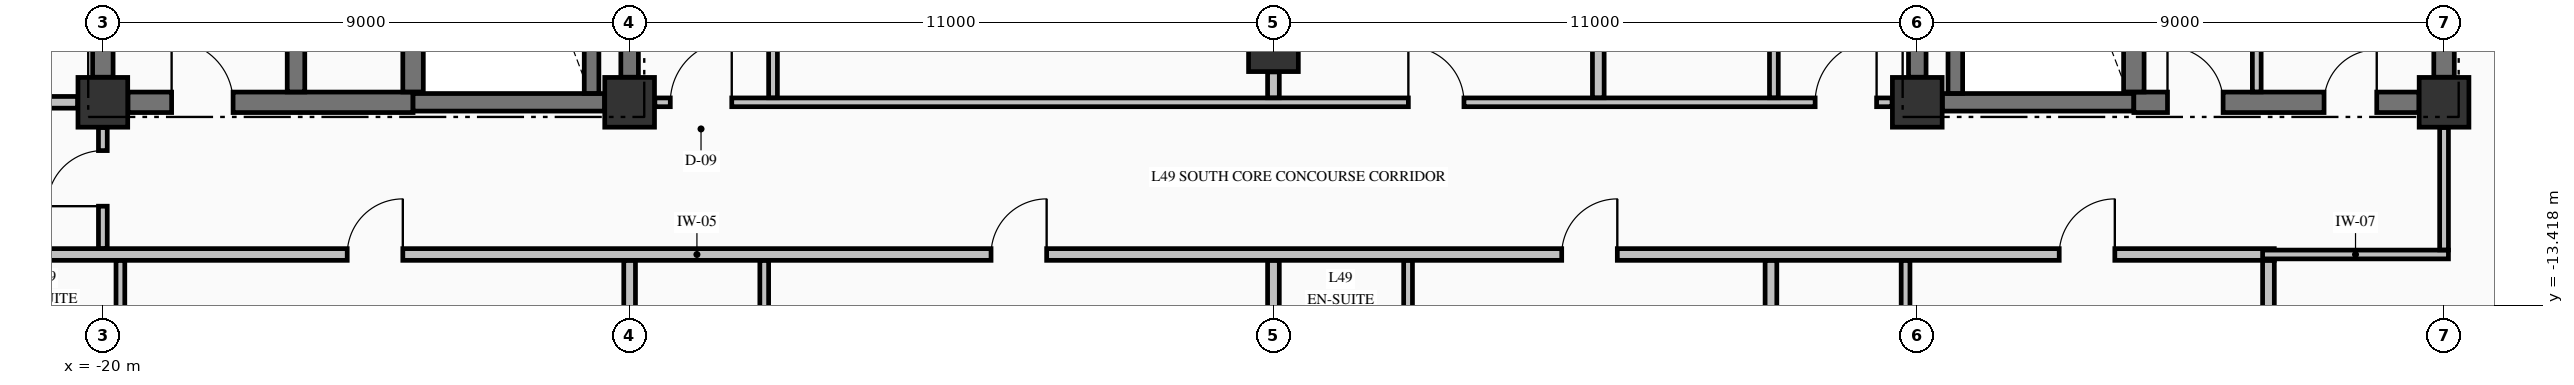
"""IFC4 building model, lengths in metres.
Left out: names, types, materials, properties, quantities, classifications, styles, units other than length and angle.
Written with IfcOpenShell. Run it as: python <this file> out.ifc"""

import sys

from ifc_helpers import new_model, si_unit, direction, frame, frame_2d, origin, origin_2d, place, context, subcontext, project, spatial, rectangle, extrude, element, fill, save


model = new_model("IFC4")
c1 = context("Model", 3, precision=1e-05, world=origin(), true_north=direction((0.0, 1.0)))
c2 = subcontext(c1, "Body", "Model", "MODEL_VIEW")
j1 = project(units=[si_unit("LENGTHUNIT", "METRE"), si_unit("PLANEANGLEUNIT", "RADIAN")], contexts=[c1])
p1 = place(None, origin())
s1 = spatial("IfcSite", under=j1, at=p1, CompositionType="ELEMENT")
p2 = place(p1, origin())
s2 = spatial("IfcBuilding", under=s1, at=p2, CompositionType="ELEMENT")
p3 = place(p2, frame((0.0, 0.0, 191.46)))
s3 = spatial("IfcBuildingStorey", under=s2, at=p3, CompositionType="ELEMENT", Elevation=191.46)
for number, where, z_axis, x_axis in (
    (1, (-20.0, -9.95, -0.425), (0.0, 0.0, 1.0), (1.0, 0.0, 0.0)),
    (2, (-11.0, -9.95, -0.425), (0.0, 0.0, 1.0), (1.0, 0.0, 0.0)),
    (3, (11.0, -9.95, -0.425), (0.0, 0.0, 1.0), (1.0, 0.0, 0.0)),
    (4, (20.0, -9.95, -0.425), (0.0, 0.0, 1.0), (1.0, 0.0, 0.0)),
    (5, (0.0, -9.0, -0.425), (0.0, 0.0, 1.0), (1.0, 0.0, 0.0)),
):
    element("IfcColumn", number, at=place(p3, frame(where, z_axis=z_axis, x_axis=x_axis)), inside=s3, PredefinedType="COLUMN", context=c2, shape_type="SweptSolid", body=[
        extrude(rectangle(XDim=0.85, YDim=0.85, at=origin_2d()), origin(), (0.0, 0.0, 1.0), 3.55),
    ])
p4 = place(p3, frame((-19.571, -9.95, 0.0), z_axis=(0.0, 0.0, 1.0), x_axis=(1.0, 0.0, 0.0)))
e6 = element("IfcWall", 6, at=p4, inside=s3, PredefinedType="SHEAR", context=c2, shape_type="SweptSolid", body=[
    extrude(rectangle(XDim=4.871, YDim=0.35, at=frame_2d((2.436, 0.0))), origin(), (0.0, 0.0, 1.0), 3.125),
])
p5 = place(p4, frame((0.746, 0.0, 0.0)))
e7 = element("IfcOpeningElement", 7, at=p5, cuts=e6, PredefinedType="OPENING", context=c2, shape_type="SweptSolid", body=[
    extrude(rectangle(XDim=1.05, YDim=2.15, at=frame_2d((0.525, 1.075))), frame((0.0, 0.185, 0.0), z_axis=(0.0, -1.0, 0.0), x_axis=(1.0, 0.0, 0.0)), (0.0, 0.0, 1.0), 0.37),
])
for number, where, z_axis, x_axis in (
    (8, (-14.7, -9.95, 0.0), (0.0, 0.0, 1.0), (1.0, 0.0, 0.0)),
    (9, (11.429, -9.95, 0.0), (0.0, 0.0, 1.0), (1.0, 0.0, 0.0)),
):
    element("IfcWall", number, at=place(p3, frame(where, z_axis=z_axis, x_axis=x_axis)), inside=s3, PredefinedType="SHEAR", context=c2, shape_type="SweptSolid", body=[
        extrude(rectangle(XDim=3.271, YDim=0.3, at=frame_2d((1.635, 0.0))), origin(), (0.0, 0.0, 1.0), 3.125),
    ])
p6 = place(p3, frame((14.7, -9.95, 0.0), z_axis=(0.0, 0.0, 1.0), x_axis=(1.0, 0.0, 0.0)))
e10 = element("IfcWall", 10, at=p6, inside=s3, PredefinedType="SHEAR", context=c2, shape_type="SweptSolid", body=[
    extrude(rectangle(XDim=4.871, YDim=0.35, at=frame_2d((2.436, 0.0))), origin(), (0.0, 0.0, 1.0), 3.125),
])
p7 = place(p6, frame((3.25, 0.0, 0.0)))
e11 = element("IfcOpeningElement", 11, at=p7, cuts=e10, PredefinedType="OPENING", context=c2, shape_type="SweptSolid", body=[
    extrude(rectangle(XDim=0.9, YDim=2.15, at=frame_2d((0.45, 1.075))), frame((0.0, 0.185, 0.0), z_axis=(0.0, -1.0, 0.0), x_axis=(1.0, 0.0, 0.0)), (0.0, 0.0, 1.0), 0.37),
])
p8 = place(p6, frame((0.575, 0.0, 0.0)))
e12 = element("IfcOpeningElement", 12, at=p8, cuts=e10, PredefinedType="OPENING", context=c2, shape_type="SweptSolid", body=[
    extrude(rectangle(XDim=0.95, YDim=2.15, at=frame_2d((0.475, 1.075))), frame((0.0, 0.185, 0.0), z_axis=(0.0, -1.0, 0.0), x_axis=(1.0, 0.0, 0.0)), (0.0, 0.0, 1.0), 0.37),
])
p9 = place(p3, frame((-22.1, -12.55, 0.0), z_axis=(0.0, 0.0, 1.0), x_axis=(1.0, 0.0, 0.0)))
e13 = element("IfcWall", 13, at=p9, inside=s3, PredefinedType="PARTITIONING", context=c2, shape_type="SweptSolid", body=[
    extrude(rectangle(XDim=39.2, YDim=0.2, at=frame_2d((19.6, 0.0))), origin(), (0.0, 0.0, 1.0), 3.125),
])
p10 = place(p9, frame((6.275, 0.0, 0.0)))
e14 = element("IfcOpeningElement", 14, at=p10, cuts=e13, PredefinedType="OPENING", context=c2, shape_type="SweptSolid", body=[
    extrude(rectangle(XDim=0.95, YDim=2.15, at=frame_2d((0.475, 1.075))), frame((0.0, 0.11, 0.0), z_axis=(0.0, -1.0, 0.0), x_axis=(1.0, 0.0, 0.0)), (0.0, 0.0, 1.0), 0.22),
])
p11 = place(p9, frame((17.275, 0.0, 0.0)))
e15 = element("IfcOpeningElement", 15, at=p11, cuts=e13, PredefinedType="OPENING", context=c2, shape_type="SweptSolid", body=[
    extrude(rectangle(XDim=0.95, YDim=2.15, at=frame_2d((0.475, 1.075))), frame((0.0, 0.11, 0.0), z_axis=(0.0, -1.0, 0.0), x_axis=(1.0, 0.0, 0.0)), (0.0, 0.0, 1.0), 0.22),
])
p12 = place(p9, frame((27.025, 0.0, 0.0)))
e16 = element("IfcOpeningElement", 16, at=p12, cuts=e13, PredefinedType="OPENING", context=c2, shape_type="SweptSolid", body=[
    extrude(rectangle(XDim=0.95, YDim=2.15, at=frame_2d((0.475, 1.075))), frame((0.0, 0.11, 0.0), z_axis=(0.0, -1.0, 0.0), x_axis=(1.0, 0.0, 0.0)), (0.0, 0.0, 1.0), 0.22),
])
p13 = place(p9, frame((35.525, 0.0, 0.0)))
e17 = element("IfcOpeningElement", 17, at=p13, cuts=e13, PredefinedType="OPENING", context=c2, shape_type="SweptSolid", body=[
    extrude(rectangle(XDim=0.95, YDim=2.15, at=frame_2d((0.475, 1.075))), frame((0.0, 0.11, 0.0), z_axis=(0.0, -1.0, 0.0), x_axis=(1.0, 0.0, 0.0)), (0.0, 0.0, 1.0), 0.22),
])
p14 = place(p3, frame((16.9, -12.55, 0.0), z_axis=(0.0, 0.0, 1.0), x_axis=(1.0, 0.0, 0.0)))
e18 = element("IfcWall", 18, at=p14, inside=s3, PredefinedType="PARTITIONING", context=c2, shape_type="SweptSolid", body=[
    extrude(rectangle(XDim=3.175, YDim=0.15, at=frame_2d((1.587, 0.0))), origin(), (0.0, 0.0, 1.0), 3.125),
])
p15 = place(p3, frame((-26.835, -9.95, 0.0), z_axis=(0.0, 0.0, 1.0), x_axis=(1.0, 0.0, 0.0)))
e19 = element("IfcWall", 19, at=p15, inside=s3, PredefinedType="PARTITIONING", context=c2, shape_type="SweptSolid", body=[
    extrude(rectangle(XDim=6.404, YDim=0.2, at=frame_2d((3.202, 0.0))), origin(), (0.0, 0.0, 1.0), 3.125),
])
p16 = place(p15, frame((2.86, 0.0, 0.0)))
e20 = element("IfcOpeningElement", 20, at=p16, cuts=e19, PredefinedType="OPENING", context=c2, shape_type="SweptSolid", body=[
    extrude(rectangle(XDim=0.95, YDim=2.15, at=frame_2d((0.475, 1.075))), frame((0.0, 0.11, 0.0), z_axis=(0.0, -1.0, 0.0), x_axis=(1.0, 0.0, 0.0)), (0.0, 0.0, 1.0), 0.22),
])
p17 = place(p3, frame((-10.569, -9.95, 0.0), z_axis=(0.0, 0.0, 1.0), x_axis=(1.0, 0.0, 0.0)))
e21 = element("IfcWall", 21, at=p17, inside=s3, PredefinedType="PARTITIONING", context=c2, shape_type="SweptSolid", body=[
    extrude(rectangle(XDim=21.138, YDim=0.15, at=frame_2d((10.569, 0.0))), origin(), (0.0, 0.0, 1.0), 3.125),
])
p18 = place(p17, frame((0.264, 0.0, 0.0)))
e22 = element("IfcOpeningElement", 22, at=p18, cuts=e21, PredefinedType="OPENING", context=c2, shape_type="SweptSolid", body=[
    extrude(rectangle(XDim=1.05, YDim=2.15, at=frame_2d((0.525, 1.075))), frame((0.0, 0.085, 0.0), z_axis=(0.0, -1.0, 0.0), x_axis=(1.0, 0.0, 0.0)), (0.0, 0.0, 1.0), 0.17),
])
p19 = place(p17, frame((19.824, 0.0, 0.0)))
e23 = element("IfcOpeningElement", 23, at=p19, cuts=e21, PredefinedType="OPENING", context=c2, shape_type="SweptSolid", body=[
    extrude(rectangle(XDim=1.05, YDim=2.15, at=frame_2d((0.525, 1.075))), frame((0.0, 0.085, 0.0), z_axis=(0.0, -1.0, 0.0), x_axis=(1.0, 0.0, 0.0)), (0.0, 0.0, 1.0), 0.17),
])
p20 = place(p17, frame((12.874, 0.0, 0.0)))
e24 = element("IfcOpeningElement", 24, at=p20, cuts=e21, PredefinedType="OPENING", context=c2, shape_type="SweptSolid", body=[
    extrude(rectangle(XDim=0.95, YDim=2.15, at=frame_2d((0.475, 1.075))), frame((0.0, 0.085, 0.0), z_axis=(0.0, -1.0, 0.0), x_axis=(1.0, 0.0, 0.0)), (0.0, 0.0, 1.0), 0.17),
])
p21 = place(p3, frame((-20.0, -9.521, 0.0), z_axis=(0.0, 0.0, 1.0), x_axis=(0.0, 1.0, 0.0)))
e25 = element("IfcWall", 25, at=p21, inside=s3, PredefinedType="SHEAR", context=c2, shape_type="SweptSolid", body=[
    extrude(rectangle(XDim=9.092, YDim=0.35, at=frame_2d((4.546, 0.0))), origin(), (0.0, 0.0, 1.0), 3.125),
])
p22 = place(p3, frame((-16.7, -9.773, 0.0), z_axis=(0.0, 0.0, 1.0), x_axis=(0.0, 1.0, 0.0)))
e26 = element("IfcWall", 26, at=p22, inside=s3, PredefinedType="SHEAR", context=c2, shape_type="SweptSolid", body=[
    extrude(rectangle(XDim=9.371, YDim=0.3, at=frame_2d((4.686, 0.0))), origin(), (0.0, 0.0, 1.0), 3.125),
])
p23 = place(p3, frame((-14.7, -9.773, 0.0), z_axis=(0.0, 0.0, 1.0), x_axis=(0.0, 1.0, 0.0)))
e27 = element("IfcWall", 27, at=p23, inside=s3, PredefinedType="SHEAR", context=c2, shape_type="SweptSolid", body=[
    extrude(rectangle(XDim=9.371, YDim=0.35, at=frame_2d((4.686, 0.0))), origin(), (0.0, 0.0, 1.0), 3.125),
])
p24 = place(p3, frame((-11.65, -9.798, 0.0), z_axis=(0.0, 0.0, 1.0), x_axis=(0.0, 1.0, 0.0)))
e28 = element("IfcWall", 28, at=p24, inside=s3, PredefinedType="SOLIDWALL", context=c2, shape_type="SweptSolid", body=[
    extrude(rectangle(XDim=9.396, YDim=0.25, at=frame_2d((4.698, 0.0))), origin(), (0.0, 0.0, 1.0), 3.125),
])
for number, where, z_axis, x_axis in (
    (29, (-11.0, -9.521, 0.0), (0.0, 0.0, 1.0), (0.0, 1.0, 0.0)),
    (30, (11.0, -9.521, 0.0), (0.0, 0.0, 1.0), (0.0, 1.0, 0.0)),
):
    element("IfcWall", number, at=place(p3, frame(where, z_axis=z_axis, x_axis=x_axis)), inside=s3, PredefinedType="SHEAR", context=c2, shape_type="SweptSolid", body=[
        extrude(rectangle(XDim=9.092, YDim=0.3, at=frame_2d((4.546, 0.0))), origin(), (0.0, 0.0, 1.0), 3.125),
    ])
p25 = place(p3, frame((11.65, -9.798, 0.0), z_axis=(0.0, 0.0, 1.0), x_axis=(0.0, 1.0, 0.0)))
e31 = element("IfcWall", 31, at=p25, inside=s3, PredefinedType="SOLIDWALL", context=c2, shape_type="SweptSolid", body=[
    extrude(rectangle(XDim=9.396, YDim=0.25, at=frame_2d((4.698, 0.0))), origin(), (0.0, 0.0, 1.0), 3.125),
])
p26 = place(p3, frame((14.7, -9.773, 0.0), z_axis=(0.0, 0.0, 1.0), x_axis=(0.0, 1.0, 0.0)))
e32 = element("IfcWall", 32, at=p26, inside=s3, PredefinedType="SHEAR", context=c2, shape_type="SweptSolid", body=[
    extrude(rectangle(XDim=9.371, YDim=0.35, at=frame_2d((4.686, 0.0))), origin(), (0.0, 0.0, 1.0), 3.125),
])
p27 = place(p3, frame((20.0, -9.521, 0.0), z_axis=(0.0, 0.0, 1.0), x_axis=(0.0, 1.0, 0.0)))
e33 = element("IfcWall", 33, at=p27, inside=s3, PredefinedType="SHEAR", context=c2, shape_type="SweptSolid", body=[
    extrude(rectangle(XDim=9.092, YDim=0.35, at=frame_2d((4.546, 0.0))), origin(), (0.0, 0.0, 1.0), 3.125),
])
p28 = place(p3, frame((-20.0, -12.447, 0.0), z_axis=(0.0, 0.0, 1.0), x_axis=(0.0, 1.0, 0.0)))
e34 = element("IfcWall", 34, at=p28, inside=s3, PredefinedType="PARTITIONING", context=c2, shape_type="SweptSolid", body=[
    extrude(rectangle(XDim=2.066, YDim=0.15, at=frame_2d((1.033, 0.0))), origin(), (0.0, 0.0, 1.0), 2.317),
])
p29 = place(p28, frame((0.722, 0.0, 0.0)))
e35 = element("IfcOpeningElement", 35, at=p29, cuts=e34, PredefinedType="OPENING", context=c2, shape_type="SweptSolid", body=[
    extrude(rectangle(XDim=0.95, YDim=2.15, at=frame_2d((0.475, 1.075))), frame((0.0, 0.085, 0.0), z_axis=(0.0, -1.0, 0.0), x_axis=(1.0, 0.0, 0.0)), (0.0, 0.0, 1.0), 0.17),
])
p30 = place(p3, frame((-19.7, -15.422, 0.0), z_axis=(0.0, 0.0, 1.0), x_axis=(0.0, 1.0, 0.0)))
e36 = element("IfcWall", 36, at=p30, inside=s3, PredefinedType="PARTITIONING", context=c2, shape_type="SweptSolid", body=[
    extrude(rectangle(XDim=2.769, YDim=0.15, at=frame_2d((1.385, 0.0))), origin(), (0.0, 0.0, 1.0), 2.317),
])
p31 = place(p3, frame((-11.0, -14.722, 0.0), z_axis=(0.0, 0.0, 1.0), x_axis=(0.0, 1.0, 0.0)))
e37 = element("IfcWall", 37, at=p31, inside=s3, PredefinedType="PARTITIONING", context=c2, shape_type="SweptSolid", body=[
    extrude(rectangle(XDim=2.069, YDim=0.2, at=frame_2d((1.034, 0.0))), origin(), (0.0, 0.0, 1.0), 2.317),
])
p32 = place(p3, frame((-8.7, -14.722, 0.0), z_axis=(0.0, 0.0, 1.0), x_axis=(0.0, 1.0, 0.0)))
e38 = element("IfcWall", 38, at=p32, inside=s3, PredefinedType="PARTITIONING", context=c2, shape_type="SweptSolid", body=[
    extrude(rectangle(XDim=2.069, YDim=0.15, at=frame_2d((1.034, 0.0))), origin(), (0.0, 0.0, 1.0), 3.125),
])
p33 = place(p3, frame((-8.55, -9.872, 0.0), z_axis=(0.0, 0.0, 1.0), x_axis=(0.0, 1.0, 0.0)))
e39 = element("IfcWall", 39, at=p33, inside=s3, PredefinedType="PARTITIONING", context=c2, shape_type="SweptSolid", body=[
    extrude(rectangle(XDim=12.969, YDim=0.15, at=frame_2d((6.484, 0.0))), origin(), (0.0, 0.0, 1.0), 3.125),
])
p34 = place(p33, frame((6.002, 0.0, 0.0)))
e40 = element("IfcOpeningElement", 40, at=p34, cuts=e39, PredefinedType="OPENING", context=c2, shape_type="SweptSolid", body=[
    extrude(rectangle(XDim=1.0, YDim=2.15, at=frame_2d((0.5, 1.075))), frame((0.0, 0.085, 0.0), z_axis=(0.0, -1.0, 0.0), x_axis=(1.0, 0.0, 0.0)), (0.0, 0.0, 1.0), 0.17),
])
p35 = place(p3, frame((0.0, -15.422, 0.0), z_axis=(0.0, 0.0, 1.0), x_axis=(0.0, 1.0, 0.0)))
e41 = element("IfcWall", 41, at=p35, inside=s3, PredefinedType="PARTITIONING", context=c2, shape_type="SweptSolid", body=[
    extrude(rectangle(XDim=2.769, YDim=0.2, at=frame_2d((1.385, 0.0))), origin(), (0.0, 0.0, 1.0), 2.317),
])
p36 = place(p3, frame((0.0, -9.872, 0.0), z_axis=(0.0, 0.0, 1.0), x_axis=(0.0, 1.0, 0.0)))
e42 = element("IfcWall", 42, at=p36, inside=s3, PredefinedType="PARTITIONING", context=c2, shape_type="SweptSolid", body=[
    extrude(rectangle(XDim=0.441, YDim=0.2, at=frame_2d((0.221, 0.0))), origin(), (0.0, 0.0, 1.0), 2.317),
])
p37 = place(p3, frame((2.3, -15.422, 0.0), z_axis=(0.0, 0.0, 1.0), x_axis=(0.0, 1.0, 0.0)))
e43 = element("IfcWall", 43, at=p37, inside=s3, PredefinedType="PARTITIONING", context=c2, shape_type="SweptSolid", body=[
    extrude(rectangle(XDim=2.769, YDim=0.15, at=frame_2d((1.385, 0.0))), origin(), (0.0, 0.0, 1.0), 3.125),
])
p38 = place(p3, frame((5.55, -9.872, 0.0), z_axis=(0.0, 0.0, 1.0), x_axis=(0.0, 1.0, 0.0)))
e44 = element("IfcWall", 44, at=p38, inside=s3, PredefinedType="PARTITIONING", context=c2, shape_type="SweptSolid", body=[
    extrude(rectangle(XDim=4.569, YDim=0.2, at=frame_2d((2.285, 0.0))), origin(), (0.0, 0.0, 1.0), 3.125),
])
p39 = place(p3, frame((8.5, -14.722, 0.0), z_axis=(0.0, 0.0, 1.0), x_axis=(0.0, 1.0, 0.0)))
e45 = element("IfcWall", 45, at=p39, inside=s3, PredefinedType="PARTITIONING", context=c2, shape_type="SweptSolid", body=[
    extrude(rectangle(XDim=2.069, YDim=0.2, at=frame_2d((1.034, 0.0))), origin(), (0.0, 0.0, 1.0), 3.125),
])
p40 = place(p3, frame((8.55, -9.872, 0.0), z_axis=(0.0, 0.0, 1.0), x_axis=(0.0, 1.0, 0.0)))
e46 = element("IfcWall", 46, at=p40, inside=s3, PredefinedType="PARTITIONING", context=c2, shape_type="SweptSolid", body=[
    extrude(rectangle(XDim=4.569, YDim=0.15, at=frame_2d((2.285, 0.0))), origin(), (0.0, 0.0, 1.0), 3.125),
])
p41 = place(p40, frame((1.847, 0.0, 0.0)))
e47 = element("IfcOpeningElement", 47, at=p41, cuts=e46, PredefinedType="OPENING", context=c2, shape_type="SweptSolid", body=[
    extrude(rectangle(XDim=0.95, YDim=2.15, at=frame_2d((0.475, 1.075))), frame((0.0, 0.085, 0.0), z_axis=(0.0, -1.0, 0.0), x_axis=(1.0, 0.0, 0.0)), (0.0, 0.0, 1.0), 0.17),
])
p42 = place(p3, frame((10.8, -14.722, 0.0), z_axis=(0.0, 0.0, 1.0), x_axis=(0.0, 1.0, 0.0)))
e48 = element("IfcWall", 48, at=p42, inside=s3, PredefinedType="PARTITIONING", context=c2, shape_type="SweptSolid", body=[
    extrude(rectangle(XDim=2.069, YDim=0.15, at=frame_2d((1.034, 0.0))), origin(), (0.0, 0.0, 1.0), 2.317),
])
p43 = place(p3, frame((16.8, -9.772, 0.0), z_axis=(0.0, 0.0, 1.0), x_axis=(0.0, 1.0, 0.0)))
e49 = element("IfcWall", 49, at=p43, inside=s3, PredefinedType="PARTITIONING", context=c2, shape_type="SweptSolid", body=[
    extrude(rectangle(XDim=7.194, YDim=0.15, at=frame_2d((3.597, 0.0))), origin(), (0.0, 0.0, 1.0), 3.125),
])
p44 = place(p3, frame((17.0, -18.994, 0.0), z_axis=(0.0, 0.0, 1.0), x_axis=(0.0, 1.0, 0.0)))
e50 = element("IfcWall", 50, at=p44, inside=s3, PredefinedType="PARTITIONING", context=c2, shape_type="SweptSolid", body=[
    extrude(rectangle(XDim=6.341, YDim=0.2, at=frame_2d((3.17, 0.0))), origin(), (0.0, 0.0, 1.0), 3.125),
])
p45 = place(p3, frame((20.0, -12.472, 0.0), z_axis=(0.0, 0.0, 1.0), x_axis=(0.0, 1.0, 0.0)))
e51 = element("IfcWall", 51, at=p45, inside=s3, PredefinedType="PARTITIONING", context=c2, shape_type="SweptSolid", body=[
    extrude(rectangle(XDim=2.091, YDim=0.15, at=frame_2d((1.045, 0.0))), origin(), (0.0, 0.0, 1.0), 2.317),
])
p46 = place(p5, origin())
e52 = element("IfcDoor", 52, at=p46, inside=s3, OperationType="SINGLE_SWING_LEFT", PredefinedType="DOOR", context=c2, shape_type="SweptSolid", body=[
    extrude(rectangle(XDim=1.05, YDim=2.15, at=frame_2d((0.525, 1.075))), frame((0.0, 0.025, 0.0), z_axis=(0.0, -1.0, 0.0), x_axis=(1.0, 0.0, 0.0)), (0.0, 0.0, 1.0), 0.05),
])
fill(e7, e52)
p47 = place(p7, origin())
e53 = element("IfcDoor", 53, at=p47, inside=s3, OperationType="SINGLE_SWING_RIGHT", PredefinedType="DOOR", context=c2, shape_type="SweptSolid", body=[
    extrude(rectangle(XDim=0.9, YDim=2.15, at=frame_2d((0.45, 1.075))), frame((0.0, 0.025, 0.0), z_axis=(0.0, -1.0, 0.0), x_axis=(1.0, 0.0, 0.0)), (0.0, 0.0, 1.0), 0.05),
])
fill(e11, e53)
p48 = place(p8, origin())
e54 = element("IfcDoor", 54, at=p48, inside=s3, OperationType="SINGLE_SWING_LEFT", PredefinedType="DOOR", context=c2, shape_type="SweptSolid", body=[
    extrude(rectangle(XDim=0.95, YDim=2.15, at=frame_2d((0.475, 1.075))), frame((0.0, 0.025, 0.0), z_axis=(0.0, -1.0, 0.0), x_axis=(1.0, 0.0, 0.0)), (0.0, 0.0, 1.0), 0.05),
])
fill(e12, e54)
p49 = place(p18, origin())
e55 = element("IfcDoor", 55, at=p49, inside=s3, OperationType="SINGLE_SWING_RIGHT", PredefinedType="DOOR", context=c2, shape_type="SweptSolid", body=[
    extrude(rectangle(XDim=1.05, YDim=2.15, at=frame_2d((0.525, 1.075))), frame((0.0, 0.025, 0.0), z_axis=(0.0, -1.0, 0.0), x_axis=(1.0, 0.0, 0.0)), (0.0, 0.0, 1.0), 0.05),
])
fill(e22, e55)
p50 = place(p19, origin())
e56 = element("IfcDoor", 56, at=p50, inside=s3, OperationType="SINGLE_SWING_RIGHT", PredefinedType="DOOR", context=c2, shape_type="SweptSolid", body=[
    extrude(rectangle(XDim=1.05, YDim=2.15, at=frame_2d((0.525, 1.075))), frame((0.0, 0.025, 0.0), z_axis=(0.0, -1.0, 0.0), x_axis=(1.0, 0.0, 0.0)), (0.0, 0.0, 1.0), 0.05),
])
fill(e23, e56)
p51 = place(p10, origin())
e57 = element("IfcDoor", 57, at=p51, inside=s3, OperationType="SINGLE_SWING_RIGHT", PredefinedType="DOOR", context=c2, shape_type="SweptSolid", body=[
    extrude(rectangle(XDim=0.95, YDim=2.15, at=frame_2d((0.475, 1.075))), frame((0.0, 0.025, 0.0), z_axis=(0.0, -1.0, 0.0), x_axis=(1.0, 0.0, 0.0)), (0.0, 0.0, 1.0), 0.05),
])
fill(e14, e57)
p52 = place(p11, origin())
e58 = element("IfcDoor", 58, at=p52, inside=s3, OperationType="SINGLE_SWING_RIGHT", PredefinedType="DOOR", context=c2, shape_type="SweptSolid", body=[
    extrude(rectangle(XDim=0.95, YDim=2.15, at=frame_2d((0.475, 1.075))), frame((0.0, 0.025, 0.0), z_axis=(0.0, -1.0, 0.0), x_axis=(1.0, 0.0, 0.0)), (0.0, 0.0, 1.0), 0.05),
])
fill(e15, e58)
p53 = place(p12, origin())
e59 = element("IfcDoor", 59, at=p53, inside=s3, OperationType="SINGLE_SWING_RIGHT", PredefinedType="DOOR", context=c2, shape_type="SweptSolid", body=[
    extrude(rectangle(XDim=0.95, YDim=2.15, at=frame_2d((0.475, 1.075))), frame((0.0, 0.025, 0.0), z_axis=(0.0, -1.0, 0.0), x_axis=(1.0, 0.0, 0.0)), (0.0, 0.0, 1.0), 0.05),
])
fill(e16, e59)
p54 = place(p13, origin())
e60 = element("IfcDoor", 60, at=p54, inside=s3, OperationType="SINGLE_SWING_RIGHT", PredefinedType="DOOR", context=c2, shape_type="SweptSolid", body=[
    extrude(rectangle(XDim=0.95, YDim=2.15, at=frame_2d((0.475, 1.075))), frame((0.0, 0.025, 0.0), z_axis=(0.0, -1.0, 0.0), x_axis=(1.0, 0.0, 0.0)), (0.0, 0.0, 1.0), 0.05),
])
fill(e17, e60)
p55 = place(p20, origin())
e61 = element("IfcDoor", 61, at=p55, inside=s3, OperationType="SINGLE_SWING_LEFT", PredefinedType="DOOR", context=c2, shape_type="SweptSolid", body=[
    extrude(rectangle(XDim=0.95, YDim=2.15, at=frame_2d((0.475, 1.075))), frame((0.0, 0.025, 0.0), z_axis=(0.0, -1.0, 0.0), x_axis=(1.0, 0.0, 0.0)), (0.0, 0.0, 1.0), 0.05),
])
fill(e24, e61)
p56 = place(p29, origin())
e62 = element("IfcDoor", 62, at=p56, inside=s3, OperationType="SINGLE_SWING_LEFT", PredefinedType="DOOR", context=c2, shape_type="SweptSolid", body=[
    extrude(rectangle(XDim=0.95, YDim=2.15, at=frame_2d((0.475, 1.075))), frame((0.0, 0.025, 0.0), z_axis=(0.0, -1.0, 0.0), x_axis=(1.0, 0.0, 0.0)), (0.0, 0.0, 1.0), 0.05),
])
fill(e35, e62)
save(model, sys.argv[1])
